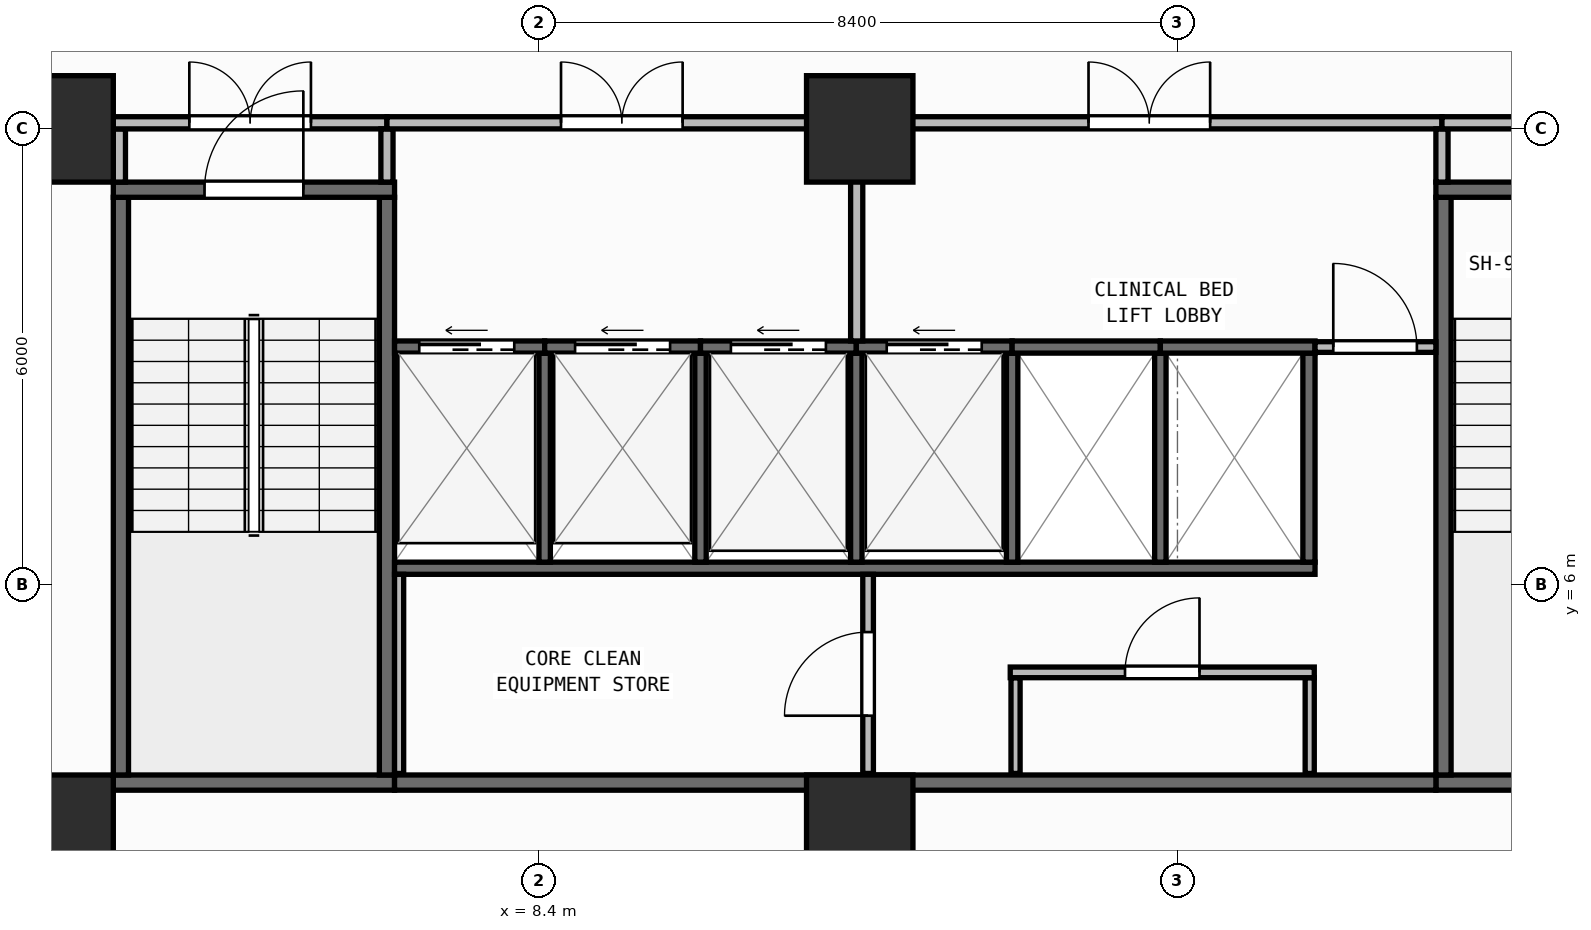
"""IFC4 building model, lengths in metres.
Left out: names, types, materials, properties, quantities, classifications, styles, units other than length and angle.
Written with IfcOpenShell. Run it as: python <this file> out.ifc"""

import sys

from ifc_helpers import new_model, si_unit, direction, frame, frame_2d, origin, origin_2d, place, context, subcontext, project, spatial, rectangle, extrude, element, fill, save


model = new_model("IFC4")
c1 = context("Model", 3, precision=1e-05, world=origin(), true_north=direction((0.0, 1.0)))
c2 = subcontext(c1, "Body", "Model", "MODEL_VIEW")
j1 = project(units=[si_unit("LENGTHUNIT", "METRE"), si_unit("PLANEANGLEUNIT", "RADIAN")], contexts=[c1])
p1 = place(None, origin())
s1 = spatial("IfcSite", under=j1, at=p1, CompositionType="ELEMENT")
p2 = place(p1, origin())
s2 = spatial("IfcBuilding", under=s1, at=p2, CompositionType="ELEMENT")
p3 = place(p2, frame((0.0, 0.0, 58.05)))
s3 = spatial("IfcBuildingStorey", under=s2, at=p3, CompositionType="ELEMENT", Elevation=58.05)
for number, where, z_axis, x_axis in (
    (1, (2.1, 2.8, 0.0), (0.0, 0.0, 1.0), (1.0, 0.0, 0.0)),
    (2, (12.62, 2.8, 0.0), (0.0, 0.0, 1.0), (1.0, 0.0, 0.0)),
    (3, (2.1, 12.0, 0.0), (0.0, 0.0, 1.0), (1.0, 0.0, 0.0)),
    (4, (12.62, 12.0, 0.0), (0.0, 0.0, 1.0), (1.0, 0.0, 0.0)),
):
    element("IfcColumn", number, at=place(p3, frame(where, z_axis=z_axis, x_axis=x_axis)), inside=s3, PredefinedType="COLUMN", context=c2, shape_type="SweptSolid", body=[
        extrude(rectangle(XDim=1.4, YDim=1.4, at=origin_2d()), origin(), (0.0, 0.0, 1.0), 3.95),
    ])
p4 = place(p3, frame((2.76, 0.174, 0.0), z_axis=(0.0, 0.0, 1.0), x_axis=(0.996571478456, 0.082736257641, 0.0)))
e5 = element("IfcWall", 5, at=p4, inside=s3, PredefinedType="STANDARD", context=c2, shape_type="SweptSolid", body=[
    extrude(rectangle(XDim=52.861, YDim=0.26, at=frame_2d((26.431, 0.0))), origin(), (0.0, 0.0, 1.0), 3.71),
])
p5 = place(p4, frame((25.231, 0.0, 0.9)))
e6 = element("IfcOpeningElement", 6, at=p5, cuts=e5, PredefinedType="OPENING", context=c2, shape_type="SweptSolid", body=[
    extrude(rectangle(XDim=2.4, YDim=1.65, at=frame_2d((1.2, 0.825))), frame((0.0, 0.14, 0.0), z_axis=(0.0, -1.0, 0.0), x_axis=(1.0, 0.0, 0.0)), (0.0, 0.0, 1.0), 0.28),
])
p6 = place(p3, frame((2.8, 3.4, 0.0), z_axis=(0.0, 0.0, 1.0), x_axis=(1.0, 0.0, 0.0)))
e7 = element("IfcWall", 7, at=p6, inside=s3, PredefinedType="SHEAR", context=c2, shape_type="SweptSolid", body=[
    extrude(rectangle(XDim=3.7, YDim=0.2, at=frame_2d((1.85, 0.0))), origin(), (0.0, 0.0, 1.0), 3.71),
])
for number, where, z_axis, x_axis in (
    (8, (2.9, 3.5, 0.0), (0.0, 0.0, 1.0), (0.0, 1.0, 0.0)),
    (9, (6.4, 3.5, 0.0), (0.0, 0.0, 1.0), (0.0, 1.0, 0.0)),
):
    element("IfcWall", number, at=place(p3, frame(where, z_axis=z_axis, x_axis=x_axis)), inside=s3, PredefinedType="SHEAR", context=c2, shape_type="SweptSolid", body=[
        extrude(rectangle(XDim=7.6, YDim=0.2, at=frame_2d((3.8, 0.0))), origin(), (0.0, 0.0, 1.0), 3.71),
    ])
p7 = place(p3, frame((2.8, 11.2, 0.0), z_axis=(0.0, 0.0, 1.0), x_axis=(1.0, 0.0, 0.0)))
e10 = element("IfcWall", 10, at=p7, inside=s3, PredefinedType="SHEAR", context=c2, shape_type="SweptSolid", body=[
    extrude(rectangle(XDim=3.7, YDim=0.2, at=frame_2d((1.85, 0.0))), origin(), (0.0, 0.0, 1.0), 3.71),
])
p8 = place(p7, frame((1.2, 0.0, 0.0)))
e11 = element("IfcOpeningElement", 11, at=p8, cuts=e10, PredefinedType="OPENING", context=c2, shape_type="SweptSolid", body=[
    extrude(rectangle(XDim=1.3, YDim=2.15, at=frame_2d((0.65, 1.075))), frame((0.0, 0.11, 0.0), z_axis=(0.0, -1.0, 0.0), x_axis=(1.0, 0.0, 0.0)), (0.0, 0.0, 1.0), 0.22),
])
p9 = place(p3, frame((20.2, 3.4, 0.0), z_axis=(0.0, 0.0, 1.0), x_axis=(1.0, 0.0, 0.0)))
e12 = element("IfcWall", 12, at=p9, inside=s3, PredefinedType="SHEAR", context=c2, shape_type="SweptSolid", body=[
    extrude(rectangle(XDim=3.7, YDim=0.2, at=frame_2d((1.85, 0.0))), origin(), (0.0, 0.0, 1.0), 3.71),
])
p10 = place(p3, frame((20.3, 3.5, 0.0), z_axis=(0.0, 0.0, 1.0), x_axis=(0.0, 1.0, 0.0)))
e13 = element("IfcWall", 13, at=p10, inside=s3, PredefinedType="SHEAR", context=c2, shape_type="SweptSolid", body=[
    extrude(rectangle(XDim=7.6, YDim=0.2, at=frame_2d((3.8, 0.0))), origin(), (0.0, 0.0, 1.0), 3.71),
])
p11 = place(p3, frame((20.2, 11.2, 0.0), z_axis=(0.0, 0.0, 1.0), x_axis=(1.0, 0.0, 0.0)))
e14 = element("IfcWall", 14, at=p11, inside=s3, PredefinedType="SHEAR", context=c2, shape_type="SweptSolid", body=[
    extrude(rectangle(XDim=3.7, YDim=0.2, at=frame_2d((1.85, 0.0))), origin(), (0.0, 0.0, 1.0), 3.71),
])
p12 = place(p11, frame((1.2, 0.0, 0.0)))
e15 = element("IfcOpeningElement", 15, at=p12, cuts=e14, PredefinedType="OPENING", context=c2, shape_type="SweptSolid", body=[
    extrude(rectangle(XDim=1.3, YDim=2.15, at=frame_2d((0.65, 1.075))), frame((0.0, 0.11, 0.0), z_axis=(0.0, -1.0, 0.0), x_axis=(1.0, 0.0, 0.0)), (0.0, 0.0, 1.0), 0.22),
])
p13 = place(p3, frame((6.5, 3.4, 0.0), z_axis=(0.0, 0.0, 1.0), x_axis=(1.0, 0.0, 0.0)))
e16 = element("IfcWall", 16, at=p13, inside=s3, PredefinedType="SHEAR", context=c2, shape_type="SweptSolid", body=[
    extrude(rectangle(XDim=13.7, YDim=0.2, at=frame_2d((6.85, 0.0))), origin(), (0.0, 0.0, 1.0), 3.71),
])
p14 = place(p3, frame((6.5, 6.22, 0.0), z_axis=(0.0, 0.0, 1.0), x_axis=(1.0, 0.0, 0.0)))
e17 = element("IfcWall", 17, at=p14, inside=s3, PredefinedType="SHEAR", context=c2, shape_type="SweptSolid", body=[
    extrude(rectangle(XDim=12.11, YDim=0.16, at=frame_2d((6.055, 0.0))), origin(), (0.0, 0.0, 1.0), 3.71),
])
p15 = place(p3, frame((18.53, 6.3, 0.0), z_axis=(0.0, 0.0, 1.0), x_axis=(0.0, 1.0, 0.0)))
e18 = element("IfcWall", 18, at=p15, inside=s3, PredefinedType="SHEAR", context=c2, shape_type="SweptSolid", body=[
    extrude(rectangle(XDim=2.75, YDim=0.16, at=frame_2d((1.375, 0.0))), origin(), (0.0, 0.0, 1.0), 3.71),
])
for number, where, z_axis, x_axis in (
    (19, (8.475, 6.3, 0.0), (0.0, 0.0, 1.0), (0.0, 1.0, 0.0)),
    (20, (10.525, 6.3, 0.0), (0.0, 0.0, 1.0), (0.0, 1.0, 0.0)),
    (21, (12.575, 6.3, 0.0), (0.0, 0.0, 1.0), (0.0, 1.0, 0.0)),
    (22, (14.625, 6.3, 0.0), (0.0, 0.0, 1.0), (0.0, 1.0, 0.0)),
    (23, (16.575, 6.3, 0.0), (0.0, 0.0, 1.0), (0.0, 1.0, 0.0)),
):
    element("IfcWall", number, at=place(p3, frame(where, z_axis=z_axis, x_axis=x_axis)), inside=s3, PredefinedType="SHEAR", context=c2, shape_type="SweptSolid", body=[
        extrude(rectangle(XDim=2.75, YDim=0.15, at=frame_2d((1.375, 0.0))), origin(), (0.0, 0.0, 1.0), 3.71),
    ])
p16 = place(p3, frame((6.5, 9.13, 0.0), z_axis=(0.0, 0.0, 1.0), x_axis=(1.0, 0.0, 0.0)))
e24 = element("IfcWall", 24, at=p16, inside=s3, PredefinedType="SHEAR", context=c2, shape_type="SweptSolid", body=[
    extrude(rectangle(XDim=1.975, YDim=0.16, at=frame_2d((0.988, 0.0))), origin(), (0.0, 0.0, 1.0), 3.71),
])
p17 = place(p16, frame((0.325, 0.0, 0.0)))
e25 = element("IfcOpeningElement", 25, at=p17, cuts=e24, PredefinedType="OPENING", context=c2, shape_type="SweptSolid", body=[
    extrude(rectangle(XDim=1.25, YDim=2.15, at=frame_2d((0.625, 1.075))), frame((0.0, 0.09, 0.0), z_axis=(0.0, -1.0, 0.0), x_axis=(1.0, 0.0, 0.0)), (0.0, 0.0, 1.0), 0.18),
])
p18 = place(p3, frame((8.475, 9.13, 0.0), z_axis=(0.0, 0.0, 1.0), x_axis=(1.0, 0.0, 0.0)))
e26 = element("IfcWall", 26, at=p18, inside=s3, PredefinedType="SHEAR", context=c2, shape_type="SweptSolid", body=[
    extrude(rectangle(XDim=2.05, YDim=0.16, at=frame_2d((1.025, 0.0))), origin(), (0.0, 0.0, 1.0), 3.71),
])
p19 = place(p18, frame((0.4, 0.0, 0.0)))
e27 = element("IfcOpeningElement", 27, at=p19, cuts=e26, PredefinedType="OPENING", context=c2, shape_type="SweptSolid", body=[
    extrude(rectangle(XDim=1.25, YDim=2.15, at=frame_2d((0.625, 1.075))), frame((0.0, 0.09, 0.0), z_axis=(0.0, -1.0, 0.0), x_axis=(1.0, 0.0, 0.0)), (0.0, 0.0, 1.0), 0.18),
])
p20 = place(p3, frame((10.525, 9.13, 0.0), z_axis=(0.0, 0.0, 1.0), x_axis=(1.0, 0.0, 0.0)))
e28 = element("IfcWall", 28, at=p20, inside=s3, PredefinedType="SHEAR", context=c2, shape_type="SweptSolid", body=[
    extrude(rectangle(XDim=2.05, YDim=0.16, at=frame_2d((1.025, 0.0))), origin(), (0.0, 0.0, 1.0), 3.71),
])
p21 = place(p20, frame((0.4, 0.0, 0.0)))
e29 = element("IfcOpeningElement", 29, at=p21, cuts=e28, PredefinedType="OPENING", context=c2, shape_type="SweptSolid", body=[
    extrude(rectangle(XDim=1.25, YDim=2.15, at=frame_2d((0.625, 1.075))), frame((0.0, 0.09, 0.0), z_axis=(0.0, -1.0, 0.0), x_axis=(1.0, 0.0, 0.0)), (0.0, 0.0, 1.0), 0.18),
])
p22 = place(p3, frame((12.575, 9.13, 0.0), z_axis=(0.0, 0.0, 1.0), x_axis=(1.0, 0.0, 0.0)))
e30 = element("IfcWall", 30, at=p22, inside=s3, PredefinedType="SHEAR", context=c2, shape_type="SweptSolid", body=[
    extrude(rectangle(XDim=2.05, YDim=0.16, at=frame_2d((1.025, 0.0))), origin(), (0.0, 0.0, 1.0), 3.71),
])
p23 = place(p22, frame((0.4, 0.0, 0.0)))
e31 = element("IfcOpeningElement", 31, at=p23, cuts=e30, PredefinedType="OPENING", context=c2, shape_type="SweptSolid", body=[
    extrude(rectangle(XDim=1.25, YDim=2.15, at=frame_2d((0.625, 1.075))), frame((0.0, 0.09, 0.0), z_axis=(0.0, -1.0, 0.0), x_axis=(1.0, 0.0, 0.0)), (0.0, 0.0, 1.0), 0.18),
])
p24 = place(p3, frame((14.625, 9.13, 0.0), z_axis=(0.0, 0.0, 1.0), x_axis=(1.0, 0.0, 0.0)))
e32 = element("IfcWall", 32, at=p24, inside=s3, PredefinedType="SHEAR", context=c2, shape_type="SweptSolid", body=[
    extrude(rectangle(XDim=1.95, YDim=0.16, at=frame_2d((0.975, 0.0))), origin(), (0.0, 0.0, 1.0), 3.71),
])
p25 = place(p3, frame((16.575, 9.13, 0.0), z_axis=(0.0, 0.0, 1.0), x_axis=(1.0, 0.0, 0.0)))
e33 = element("IfcWall", 33, at=p25, inside=s3, PredefinedType="SHEAR", context=c2, shape_type="SweptSolid", body=[
    extrude(rectangle(XDim=2.035, YDim=0.16, at=frame_2d((1.018, 0.0))), origin(), (0.0, 0.0, 1.0), 3.71),
])
p26 = place(p3, frame((6.56, 3.52, 0.0), z_axis=(0.0, 0.0, 1.0), x_axis=(0.0, 1.0, 0.0)))
e34 = element("IfcWall", 34, at=p26, inside=s3, PredefinedType="PARTITIONING", context=c2, shape_type="SweptSolid", body=[
    extrude(rectangle(XDim=2.62, YDim=0.12, at=frame_2d((1.31, 0.0))), origin(), (0.0, 0.0, 1.0), 3.71),
])
p27 = place(p3, frame((12.73, 3.52, 0.0), z_axis=(0.0, 0.0, 1.0), x_axis=(0.0, 1.0, 0.0)))
e35 = element("IfcWall", 35, at=p27, inside=s3, PredefinedType="PARTITIONING", context=c2, shape_type="SweptSolid", body=[
    extrude(rectangle(XDim=2.62, YDim=0.14, at=frame_2d((1.31, 0.0))), origin(), (0.0, 0.0, 1.0), 3.71),
])
p28 = place(p27, frame((0.76, 0.0, 0.0)))
e36 = element("IfcOpeningElement", 36, at=p28, cuts=e35, PredefinedType="OPENING", context=c2, shape_type="SweptSolid", body=[
    extrude(rectangle(XDim=1.1, YDim=2.1, at=frame_2d((0.55, 1.05))), frame((0.0, 0.08, 0.0), z_axis=(0.0, -1.0, 0.0), x_axis=(1.0, 0.0, 0.0)), (0.0, 0.0, 1.0), 0.16),
])
for number, where, z_axis, x_axis in (
    (37, (14.67, 3.52, 0.0), (0.0, 0.0, 1.0), (0.0, 1.0, 0.0)),
    (38, (18.54, 3.52, 0.0), (0.0, 0.0, 1.0), (0.0, 1.0, 0.0)),
):
    element("IfcWall", number, at=place(p3, frame(where, z_axis=z_axis, x_axis=x_axis)), inside=s3, PredefinedType="PARTITIONING", context=c2, shape_type="SweptSolid", body=[
        extrude(rectangle(XDim=1.26, YDim=0.12, at=frame_2d((0.63, 0.0))), origin(), (0.0, 0.0, 1.0), 3.71),
    ])
p29 = place(p3, frame((14.6, 4.85, 0.0), z_axis=(0.0, 0.0, 1.0), x_axis=(1.0, 0.0, 0.0)))
e39 = element("IfcWall", 39, at=p29, inside=s3, PredefinedType="PARTITIONING", context=c2, shape_type="SweptSolid", body=[
    extrude(rectangle(XDim=4.0, YDim=0.14, at=frame_2d((2.0, 0.0))), origin(), (0.0, 0.0, 1.0), 3.71),
])
p30 = place(p29, frame((1.51, 0.0, 0.0)))
e40 = element("IfcOpeningElement", 40, at=p30, cuts=e39, PredefinedType="OPENING", context=c2, shape_type="SweptSolid", body=[
    extrude(rectangle(XDim=0.98, YDim=2.1, at=frame_2d((0.49, 1.05))), frame((0.0, 0.08, 0.0), z_axis=(0.0, -1.0, 0.0), x_axis=(1.0, 0.0, 0.0)), (0.0, 0.0, 1.0), 0.16),
])
p31 = place(p3, frame((18.61, 9.13, 0.0), z_axis=(0.0, 0.0, 1.0), x_axis=(1.0, 0.0, 0.0)))
e41 = element("IfcWall", 41, at=p31, inside=s3, PredefinedType="PARTITIONING", context=c2, shape_type="SweptSolid", body=[
    extrude(rectangle(XDim=1.59, YDim=0.14, at=frame_2d((0.795, 0.0))), origin(), (0.0, 0.0, 1.0), 3.71),
])
p32 = place(p31, frame((0.24, 0.0, 0.0)))
e42 = element("IfcOpeningElement", 42, at=p32, cuts=e41, PredefinedType="OPENING", context=c2, shape_type="SweptSolid", body=[
    extrude(rectangle(XDim=1.1, YDim=2.1, at=frame_2d((0.55, 1.05))), frame((0.0, 0.08, 0.0), z_axis=(0.0, -1.0, 0.0), x_axis=(1.0, 0.0, 0.0)), (0.0, 0.0, 1.0), 0.16),
])
p33 = place(p3, frame((2.88, 11.3, 0.0), z_axis=(0.0, 0.0, 1.0), x_axis=(0.0, 1.0, 0.0)))
e43 = element("IfcWall", 43, at=p33, inside=s3, PredefinedType="PARTITIONING", context=c2, shape_type="SweptSolid", body=[
    extrude(rectangle(XDim=0.7, YDim=0.16, at=frame_2d((0.35, 0.0))), origin(), (0.0, 0.0, 1.0), 3.71),
])
p34 = place(p3, frame((2.8, 12.08, 0.0), z_axis=(0.0, 0.0, 1.0), x_axis=(1.0, 0.0, 0.0)))
e44 = element("IfcWall", 44, at=p34, inside=s3, PredefinedType="PARTITIONING", context=c2, shape_type="SweptSolid", body=[
    extrude(rectangle(XDim=3.6, YDim=0.16, at=frame_2d((1.8, 0.0))), origin(), (0.0, 0.0, 1.0), 3.073),
])
p35 = place(p34, frame((1.0, 0.0, 0.0)))
e45 = element("IfcOpeningElement", 45, at=p35, cuts=e44, PredefinedType="OPENING", context=c2, shape_type="SweptSolid", body=[
    extrude(rectangle(XDim=1.6, YDim=2.05, at=frame_2d((0.8, 1.025))), frame((0.0, 0.09, 0.0), z_axis=(0.0, -1.0, 0.0), x_axis=(1.0, 0.0, 0.0)), (0.0, 0.0, 1.0), 0.18),
])
p36 = place(p3, frame((6.4, 11.3, 0.0), z_axis=(0.0, 0.0, 1.0), x_axis=(0.0, 1.0, 0.0)))
e46 = element("IfcWall", 46, at=p36, inside=s3, PredefinedType="PARTITIONING", context=c2, shape_type="SweptSolid", body=[
    extrude(rectangle(XDim=0.7, YDim=0.16, at=frame_2d((0.35, 0.0))), origin(), (0.0, 0.0, 1.0), 3.71),
])
p37 = place(p3, frame((6.4, 12.08, 0.0), z_axis=(0.0, 0.0, 1.0), x_axis=(1.0, 0.0, 0.0)))
e47 = element("IfcWall", 47, at=p37, inside=s3, PredefinedType="PARTITIONING", context=c2, shape_type="SweptSolid", body=[
    extrude(rectangle(XDim=6.18, YDim=0.16, at=frame_2d((3.09, 0.0))), origin(), (0.0, 0.0, 1.0), 3.073),
])
p38 = place(p37, frame((2.29, 0.0, 0.0)))
e48 = element("IfcOpeningElement", 48, at=p38, cuts=e47, PredefinedType="OPENING", context=c2, shape_type="SweptSolid", body=[
    extrude(rectangle(XDim=1.6, YDim=2.05, at=frame_2d((0.8, 1.025))), frame((0.0, 0.09, 0.0), z_axis=(0.0, -1.0, 0.0), x_axis=(1.0, 0.0, 0.0)), (0.0, 0.0, 1.0), 0.18),
])
p39 = place(p3, frame((12.58, 9.21, 0.0), z_axis=(0.0, 0.0, 1.0), x_axis=(0.0, 1.0, 0.0)))
e49 = element("IfcWall", 49, at=p39, inside=s3, PredefinedType="PARTITIONING", context=c2, shape_type="SweptSolid", body=[
    extrude(rectangle(XDim=2.79, YDim=0.16, at=frame_2d((1.395, 0.0))), origin(), (0.0, 0.0, 1.0), 3.71),
])
p40 = place(p3, frame((12.58, 12.08, 0.0), z_axis=(0.0, 0.0, 1.0), x_axis=(1.0, 0.0, 0.0)))
e50 = element("IfcWall", 50, at=p40, inside=s3, PredefinedType="PARTITIONING", context=c2, shape_type="SweptSolid", body=[
    extrude(rectangle(XDim=7.7, YDim=0.16, at=frame_2d((3.85, 0.0))), origin(), (0.0, 0.0, 1.0), 3.073),
])
p41 = place(p40, frame((3.05, 0.0, 0.0)))
e51 = element("IfcOpeningElement", 51, at=p41, cuts=e50, PredefinedType="OPENING", context=c2, shape_type="SweptSolid", body=[
    extrude(rectangle(XDim=1.6, YDim=2.05, at=frame_2d((0.8, 1.025))), frame((0.0, 0.09, 0.0), z_axis=(0.0, -1.0, 0.0), x_axis=(1.0, 0.0, 0.0)), (0.0, 0.0, 1.0), 0.18),
])
p42 = place(p3, frame((20.28, 11.3, 0.0), z_axis=(0.0, 0.0, 1.0), x_axis=(0.0, 1.0, 0.0)))
e52 = element("IfcWall", 52, at=p42, inside=s3, PredefinedType="PARTITIONING", context=c2, shape_type="SweptSolid", body=[
    extrude(rectangle(XDim=0.7, YDim=0.16, at=frame_2d((0.35, 0.0))), origin(), (0.0, 0.0, 1.0), 3.71),
])
p43 = place(p3, frame((20.28, 12.08, 0.0), z_axis=(0.0, 0.0, 1.0), x_axis=(1.0, 0.0, 0.0)))
e53 = element("IfcWall", 53, at=p43, inside=s3, PredefinedType="PARTITIONING", context=c2, shape_type="SweptSolid", body=[
    extrude(rectangle(XDim=3.62, YDim=0.16, at=frame_2d((1.81, 0.0))), origin(), (0.0, 0.0, 1.0), 3.073),
])
p44 = place(p43, frame((1.01, 0.0, 0.0)))
e54 = element("IfcOpeningElement", 54, at=p44, cuts=e53, PredefinedType="OPENING", context=c2, shape_type="SweptSolid", body=[
    extrude(rectangle(XDim=1.6, YDim=2.05, at=frame_2d((0.8, 1.025))), frame((0.0, 0.09, 0.0), z_axis=(0.0, -1.0, 0.0), x_axis=(1.0, 0.0, 0.0)), (0.0, 0.0, 1.0), 0.18),
])
p45 = place(p8, origin())
e55 = element("IfcDoor", 55, at=p45, inside=s3, OperationType="SINGLE_SWING_RIGHT", PredefinedType="DOOR", context=c2, shape_type="SweptSolid", body=[
    extrude(rectangle(XDim=1.3, YDim=2.15, at=frame_2d((0.65, 1.075))), frame((0.0, 0.025, 0.0), z_axis=(0.0, -1.0, 0.0), x_axis=(1.0, 0.0, 0.0)), (0.0, 0.0, 1.0), 0.05),
])
fill(e11, e55)
p46 = place(p17, origin())
e56 = element("IfcDoor", 56, at=p46, inside=s3, OperationType="SLIDING_TO_LEFT", PredefinedType="DOOR", context=c2, shape_type="SweptSolid", body=[
    extrude(rectangle(XDim=1.25, YDim=2.15, at=frame_2d((0.625, 1.075))), frame((0.0, 0.025, 0.0), z_axis=(0.0, -1.0, 0.0), x_axis=(1.0, 0.0, 0.0)), (0.0, 0.0, 1.0), 0.05),
])
fill(e25, e56)
p47 = place(p19, origin())
e57 = element("IfcDoor", 57, at=p47, inside=s3, OperationType="SLIDING_TO_LEFT", PredefinedType="DOOR", context=c2, shape_type="SweptSolid", body=[
    extrude(rectangle(XDim=1.25, YDim=2.15, at=frame_2d((0.625, 1.075))), frame((0.0, 0.025, 0.0), z_axis=(0.0, -1.0, 0.0), x_axis=(1.0, 0.0, 0.0)), (0.0, 0.0, 1.0), 0.05),
])
fill(e27, e57)
p48 = place(p21, origin())
e58 = element("IfcDoor", 58, at=p48, inside=s3, OperationType="SLIDING_TO_LEFT", PredefinedType="DOOR", context=c2, shape_type="SweptSolid", body=[
    extrude(rectangle(XDim=1.25, YDim=2.15, at=frame_2d((0.625, 1.075))), frame((0.0, 0.025, 0.0), z_axis=(0.0, -1.0, 0.0), x_axis=(1.0, 0.0, 0.0)), (0.0, 0.0, 1.0), 0.05),
])
fill(e29, e58)
p49 = place(p23, origin())
e59 = element("IfcDoor", 59, at=p49, inside=s3, OperationType="SLIDING_TO_LEFT", PredefinedType="DOOR", context=c2, shape_type="SweptSolid", body=[
    extrude(rectangle(XDim=1.25, YDim=2.15, at=frame_2d((0.625, 1.075))), frame((0.0, 0.025, 0.0), z_axis=(0.0, -1.0, 0.0), x_axis=(1.0, 0.0, 0.0)), (0.0, 0.0, 1.0), 0.05),
])
fill(e31, e59)
p50 = place(p28, origin())
e60 = element("IfcDoor", 60, at=p50, inside=s3, OperationType="SINGLE_SWING_LEFT", PredefinedType="DOOR", context=c2, shape_type="SweptSolid", body=[
    extrude(rectangle(XDim=1.1, YDim=2.1, at=frame_2d((0.55, 1.05))), frame((0.0, 0.025, 0.0), z_axis=(0.0, -1.0, 0.0), x_axis=(1.0, 0.0, 0.0)), (0.0, 0.0, 1.0), 0.05),
])
fill(e36, e60)
p51 = place(p30, origin())
e61 = element("IfcDoor", 61, at=p51, inside=s3, OperationType="SINGLE_SWING_RIGHT", PredefinedType="DOOR", context=c2, shape_type="SweptSolid", body=[
    extrude(rectangle(XDim=0.98, YDim=2.1, at=frame_2d((0.49, 1.05))), frame((0.0, 0.025, 0.0), z_axis=(0.0, -1.0, 0.0), x_axis=(1.0, 0.0, 0.0)), (0.0, 0.0, 1.0), 0.05),
])
fill(e40, e61)
p52 = place(p32, origin())
e62 = element("IfcDoor", 62, at=p52, inside=s3, OperationType="SINGLE_SWING_LEFT", PredefinedType="DOOR", context=c2, shape_type="SweptSolid", body=[
    extrude(rectangle(XDim=1.1, YDim=2.1, at=frame_2d((0.55, 1.05))), frame((0.0, 0.025, 0.0), z_axis=(0.0, -1.0, 0.0), x_axis=(1.0, 0.0, 0.0)), (0.0, 0.0, 1.0), 0.05),
])
fill(e42, e62)
p53 = place(p35, origin())
e63 = element("IfcDoor", 63, at=p53, inside=s3, OperationType="DOUBLE_DOOR_SINGLE_SWING", PredefinedType="DOOR", context=c2, shape_type="SweptSolid", body=[
    extrude(rectangle(XDim=1.6, YDim=2.05, at=frame_2d((0.8, 1.025))), frame((0.0, 0.025, 0.0), z_axis=(0.0, -1.0, 0.0), x_axis=(1.0, 0.0, 0.0)), (0.0, 0.0, 1.0), 0.05),
])
fill(e45, e63)
p54 = place(p38, origin())
e64 = element("IfcDoor", 64, at=p54, inside=s3, OperationType="DOUBLE_DOOR_SINGLE_SWING", PredefinedType="DOOR", context=c2, shape_type="SweptSolid", body=[
    extrude(rectangle(XDim=1.6, YDim=2.05, at=frame_2d((0.8, 1.025))), frame((0.0, 0.025, 0.0), z_axis=(0.0, -1.0, 0.0), x_axis=(1.0, 0.0, 0.0)), (0.0, 0.0, 1.0), 0.05),
])
fill(e48, e64)
p55 = place(p41, origin())
e65 = element("IfcDoor", 65, at=p55, inside=s3, OperationType="DOUBLE_DOOR_SINGLE_SWING", PredefinedType="DOOR", context=c2, shape_type="SweptSolid", body=[
    extrude(rectangle(XDim=1.6, YDim=2.05, at=frame_2d((0.8, 1.025))), frame((0.0, 0.025, 0.0), z_axis=(0.0, -1.0, 0.0), x_axis=(1.0, 0.0, 0.0)), (0.0, 0.0, 1.0), 0.05),
])
fill(e51, e65)
save(model, sys.argv[1])
